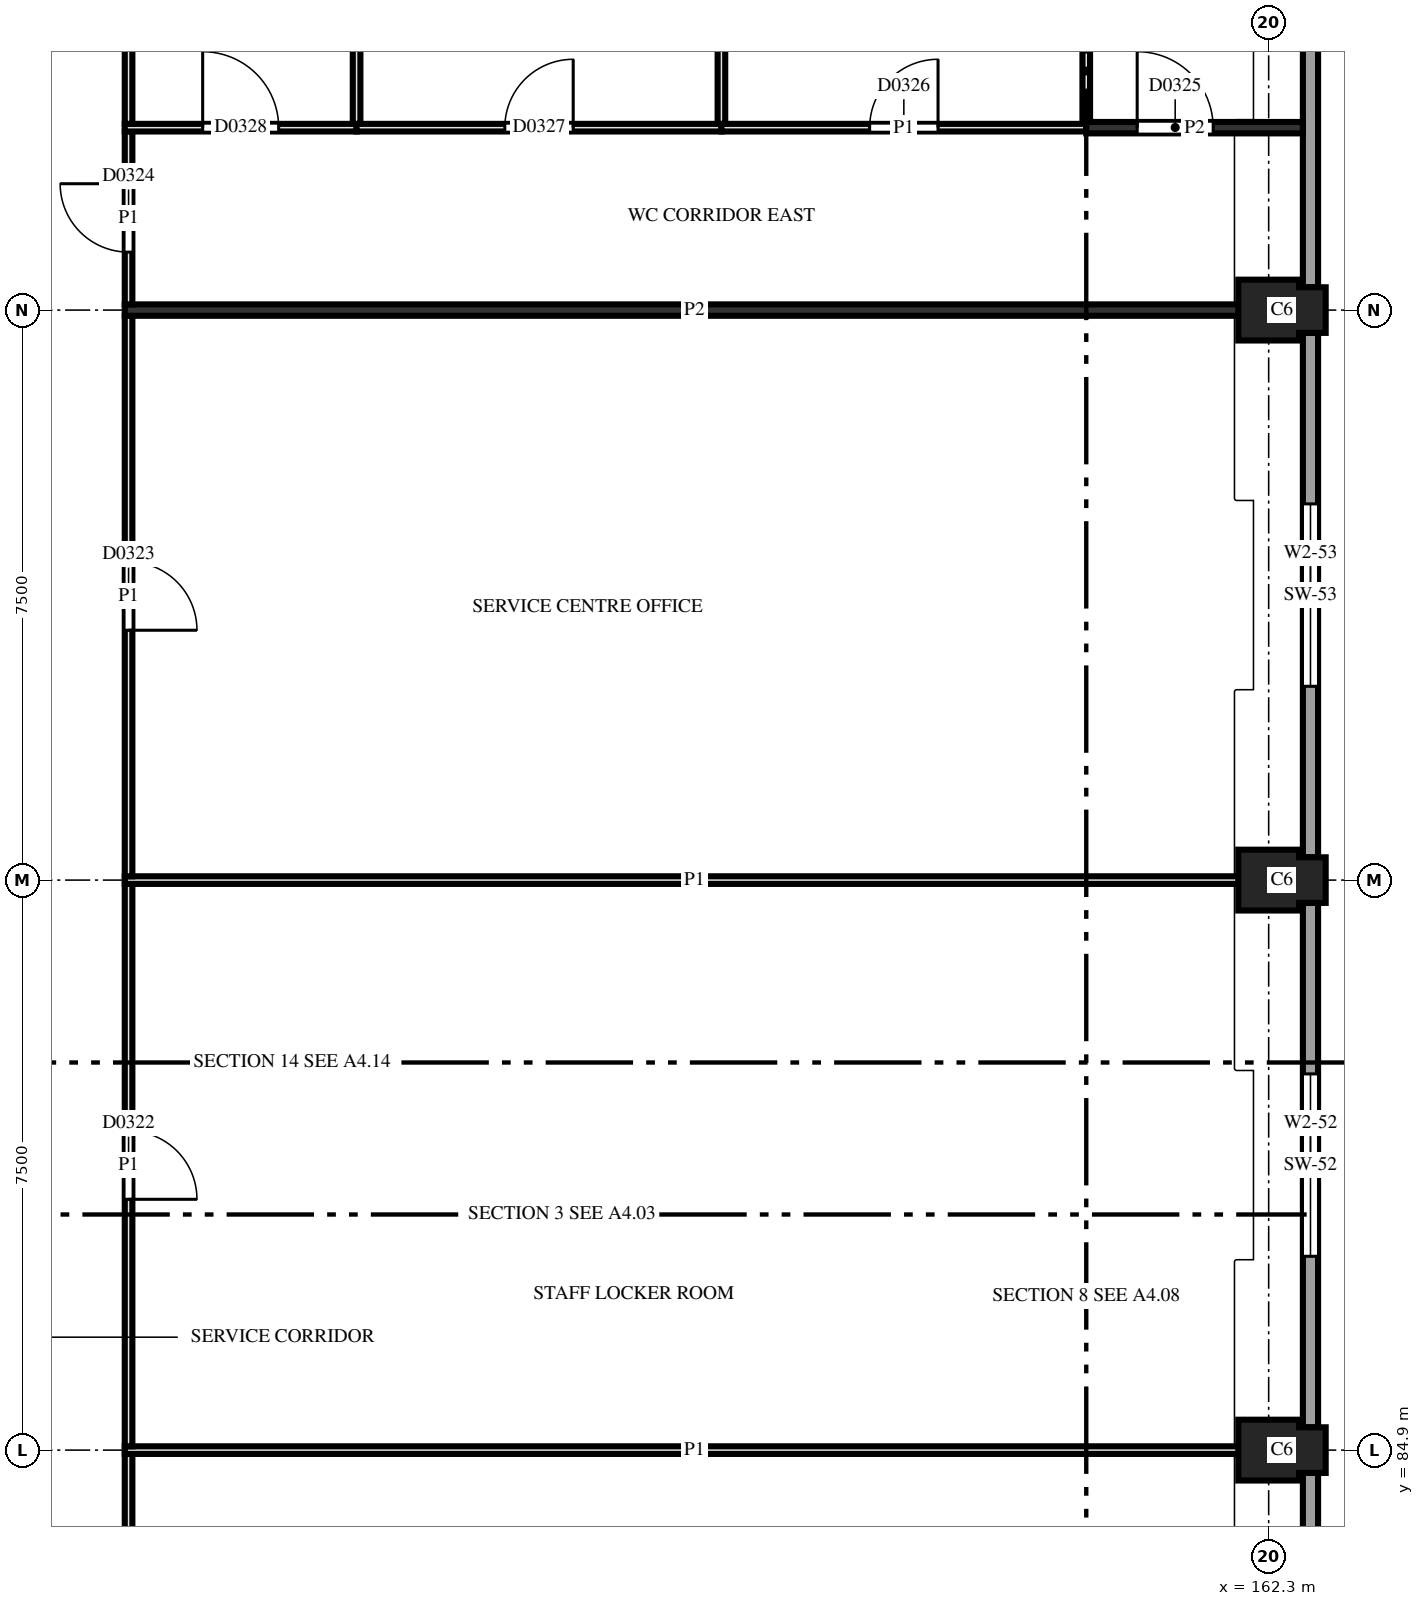
"""IFC4 building model, lengths in metres.
Left out: names, types, materials, properties, quantities, classifications, styles, units other than length and angle.
Written with IfcOpenShell. Run it as: python <this file> out.ifc"""

import sys

from ifc_helpers import new_model, si_unit, direction, frame, frame_2d, origin, place, context, subcontext, project, spatial, polyline, rectangle, outline, extrude, element, fill, save


model = new_model("IFC4")
c1 = context("Model", 3, precision=1e-05, world=origin(), true_north=direction((0.0, 1.0)))
c2 = subcontext(c1, "Body", "Model", "MODEL_VIEW")
j1 = project(units=[si_unit("LENGTHUNIT", "METRE"), si_unit("PLANEANGLEUNIT", "RADIAN")], contexts=[c1])
p1 = place(None, origin())
s1 = spatial("IfcSite", under=j1, at=p1, CompositionType="ELEMENT")
p2 = place(p1, origin())
s2 = spatial("IfcBuilding", under=s1, at=p2, CompositionType="ELEMENT")
p3 = place(p2, frame((0.0, 0.0, 11.9)))
s3 = spatial("IfcBuildingStorey", under=s2, at=p3, CompositionType="ELEMENT", Elevation=11.9)
for number, where, z_axis, x_axis in (
    (1, (162.3, 84.9, 0.0), (0.0, 0.0, 1.0), (1.0, 0.0, 0.0)),
    (2, (162.3, 92.4, 0.0), (0.0, 0.0, 1.0), (1.0, 0.0, 0.0)),
    (3, (162.3, 99.9, 0.0), (0.0, 0.0, 1.0), (1.0, 0.0, 0.0)),
):
    element("IfcColumn", number, at=place(p3, frame(where, z_axis=z_axis, x_axis=x_axis)), inside=s3, PredefinedType="COLUMN", context=c2, shape_type="SweptSolid", body=[
        extrude(outline(polyline([(-0.4, -0.4), (0.4, -0.4), (0.4, -0.3), (0.75, -0.3), (0.75, 0.3), (0.4, 0.3), (0.4, 0.4), (-0.4, 0.4), (-0.4, -0.4)])), origin(), (0.0, 0.0, 1.0), 3.7),
    ])
p4 = place(p3, frame((162.85, 77.7, 0.0), z_axis=(0.0, 0.0, 1.0), x_axis=(0.0, 1.0, 0.0)))
e4 = element("IfcWall", 4, at=p4, inside=s3, PredefinedType="SOLIDWALL", context=c2, shape_type="SweptSolid", body=[
    extrude(rectangle(XDim=6.9, YDim=0.2, at=frame_2d((3.45, 0.0))), origin(), (0.0, 0.0, 1.0), 2.3),
])
p5 = place(p4, frame((2.25, 0.0, 0.55)))
e5 = element("IfcOpeningElement", 5, at=p5, cuts=e4, PredefinedType="OPENING", context=c2, shape_type="SweptSolid", body=[
    extrude(rectangle(XDim=2.4, YDim=1.0, at=frame_2d((1.2, 0.5))), frame((0.0, 0.11, 0.0), z_axis=(0.0, -1.0, 0.0), x_axis=(1.0, 0.0, 0.0)), (0.0, 0.0, 1.0), 0.22),
])
p6 = place(p3, frame((162.85, 85.2, 0.0), z_axis=(0.0, 0.0, 1.0), x_axis=(0.0, 1.0, 0.0)))
e6 = element("IfcWall", 6, at=p6, inside=s3, PredefinedType="SOLIDWALL", context=c2, shape_type="SweptSolid", body=[
    extrude(rectangle(XDim=6.9, YDim=0.2, at=frame_2d((3.45, 0.0))), origin(), (0.0, 0.0, 1.0), 2.3),
])
p7 = place(p6, frame((2.25, 0.0, 0.55)))
e7 = element("IfcOpeningElement", 7, at=p7, cuts=e6, PredefinedType="OPENING", context=c2, shape_type="SweptSolid", body=[
    extrude(rectangle(XDim=2.4, YDim=1.0, at=frame_2d((1.2, 0.5))), frame((0.0, 0.11, 0.0), z_axis=(0.0, -1.0, 0.0), x_axis=(1.0, 0.0, 0.0)), (0.0, 0.0, 1.0), 0.22),
])
p8 = place(p3, frame((162.85, 92.7, 0.0), z_axis=(0.0, 0.0, 1.0), x_axis=(0.0, 1.0, 0.0)))
e8 = element("IfcWall", 8, at=p8, inside=s3, PredefinedType="SOLIDWALL", context=c2, shape_type="SweptSolid", body=[
    extrude(rectangle(XDim=6.9, YDim=0.2, at=frame_2d((3.45, 0.0))), origin(), (0.0, 0.0, 1.0), 2.3),
])
p9 = place(p8, frame((2.25, 0.0, 0.55)))
e9 = element("IfcOpeningElement", 9, at=p9, cuts=e8, PredefinedType="OPENING", context=c2, shape_type="SweptSolid", body=[
    extrude(rectangle(XDim=2.4, YDim=1.0, at=frame_2d((1.2, 0.5))), frame((0.0, 0.11, 0.0), z_axis=(0.0, -1.0, 0.0), x_axis=(1.0, 0.0, 0.0)), (0.0, 0.0, 1.0), 0.22),
])
p10 = place(p3, frame((162.85, 100.2, 0.0), z_axis=(0.0, 0.0, 1.0), x_axis=(0.0, 1.0, 0.0)))
e10 = element("IfcWall", 10, at=p10, inside=s3, PredefinedType="SOLIDWALL", context=c2, shape_type="SweptSolid", body=[
    extrude(rectangle(XDim=6.9, YDim=0.2, at=frame_2d((3.45, 0.0))), origin(), (0.0, 0.0, 1.0), 2.3),
])
p11 = place(p10, frame((3.4, 0.0, 0.55)))
e11 = element("IfcOpeningElement", 11, at=p11, cuts=e10, PredefinedType="OPENING", context=c2, shape_type="SweptSolid", body=[
    extrude(rectangle(XDim=2.4, YDim=1.0, at=frame_2d((1.2, 0.5))), frame((0.0, 0.11, 0.0), z_axis=(0.0, -1.0, 0.0), x_axis=(1.0, 0.0, 0.0)), (0.0, 0.0, 1.0), 0.22),
])
p12 = place(p3, frame((147.3, 84.85, 0.0), z_axis=(0.0, 0.0, 1.0), x_axis=(0.0, -1.0, 0.0)))
e12 = element("IfcWall", 12, at=p12, inside=s3, PredefinedType="PARTITIONING", context=c2, shape_type="SweptSolid", body=[
    extrude(rectangle(XDim=7.4, YDim=0.1, at=frame_2d((3.7, 0.0))), origin(), (0.0, 0.0, 1.0), 2.88),
])
p13 = place(p12, frame((3.25, 0.0, 0.0)))
e13 = element("IfcOpeningElement", 13, at=p13, cuts=e12, PredefinedType="OPENING", context=c2, shape_type="SweptSolid", body=[
    extrude(rectangle(XDim=0.9, YDim=2.1, at=frame_2d((0.45, 1.05))), frame((0.0, 0.06, 0.0), z_axis=(0.0, -1.0, 0.0), x_axis=(1.0, 0.0, 0.0)), (0.0, 0.0, 1.0), 0.12),
])
p14 = place(p3, frame((162.24, 84.9, 0.0), z_axis=(0.0, 0.0, 1.0), x_axis=(-1.0, 0.0, 0.0)))
e14 = element("IfcWall", 14, at=p14, inside=s3, PredefinedType="PARTITIONING", context=c2, shape_type="SweptSolid", body=[
    extrude(rectangle(XDim=14.99, YDim=0.1, at=frame_2d((7.495, 0.0))), origin(), (0.0, 0.0, 1.0), 2.88),
])
p15 = place(p3, frame((147.3, 92.35, 0.0), z_axis=(0.0, 0.0, 1.0), x_axis=(0.0, -1.0, 0.0)))
e15 = element("IfcWall", 15, at=p15, inside=s3, PredefinedType="PARTITIONING", context=c2, shape_type="SweptSolid", body=[
    extrude(rectangle(XDim=7.4, YDim=0.1, at=frame_2d((3.7, 0.0))), origin(), (0.0, 0.0, 1.0), 2.88),
])
p16 = place(p15, frame((3.25, 0.0, 0.0)))
e16 = element("IfcOpeningElement", 16, at=p16, cuts=e15, PredefinedType="OPENING", context=c2, shape_type="SweptSolid", body=[
    extrude(rectangle(XDim=0.9, YDim=2.1, at=frame_2d((0.45, 1.05))), frame((0.0, 0.06, 0.0), z_axis=(0.0, -1.0, 0.0), x_axis=(1.0, 0.0, 0.0)), (0.0, 0.0, 1.0), 0.12),
])
p17 = place(p3, frame((162.24, 92.4, 0.0), z_axis=(0.0, 0.0, 1.0), x_axis=(-1.0, 0.0, 0.0)))
e17 = element("IfcWall", 17, at=p17, inside=s3, PredefinedType="PARTITIONING", context=c2, shape_type="SweptSolid", body=[
    extrude(rectangle(XDim=14.99, YDim=0.1, at=frame_2d((7.495, 0.0))), origin(), (0.0, 0.0, 1.0), 2.88),
])
p18 = place(p3, frame((147.3, 99.825, 0.0), z_axis=(0.0, 0.0, 1.0), x_axis=(0.0, -1.0, 0.0)))
e18 = element("IfcWall", 18, at=p18, inside=s3, PredefinedType="PARTITIONING", context=c2, shape_type="SweptSolid", body=[
    extrude(rectangle(XDim=7.375, YDim=0.1, at=frame_2d((3.688, 0.0))), origin(), (0.0, 0.0, 1.0), 2.88),
])
p19 = place(p18, frame((3.238, 0.0, 0.0)))
e19 = element("IfcOpeningElement", 19, at=p19, cuts=e18, PredefinedType="OPENING", context=c2, shape_type="SweptSolid", body=[
    extrude(rectangle(XDim=0.9, YDim=2.1, at=frame_2d((0.45, 1.05))), frame((0.0, 0.06, 0.0), z_axis=(0.0, -1.0, 0.0), x_axis=(1.0, 0.0, 0.0)), (0.0, 0.0, 1.0), 0.12),
])
p20 = place(p3, frame((162.24, 99.9, 0.0), z_axis=(0.0, 0.0, 1.0), x_axis=(-1.0, 0.0, 0.0)))
e20 = element("IfcWall", 20, at=p20, inside=s3, PredefinedType="PARTITIONING", context=c2, shape_type="SweptSolid", body=[
    extrude(rectangle(XDim=14.99, YDim=0.15, at=frame_2d((7.495, 0.0))), origin(), (0.0, 0.0, 1.0), 2.88),
])
p21 = place(p3, frame((147.3, 102.25, 0.0), z_axis=(0.0, 0.0, 1.0), x_axis=(0.0, -1.0, 0.0)))
e21 = element("IfcWall", 21, at=p21, inside=s3, PredefinedType="PARTITIONING", context=c2, shape_type="SweptSolid", body=[
    extrude(rectangle(XDim=2.275, YDim=0.1, at=frame_2d((1.137, 0.0))), origin(), (0.0, 0.0, 1.0), 2.88),
])
p22 = place(p21, frame((0.688, 0.0, 0.0)))
e22 = element("IfcOpeningElement", 22, at=p22, cuts=e21, PredefinedType="OPENING", context=c2, shape_type="SweptSolid", body=[
    extrude(rectangle(XDim=0.9, YDim=2.1, at=frame_2d((0.45, 1.05))), frame((0.0, 0.06, 0.0), z_axis=(0.0, -1.0, 0.0), x_axis=(1.0, 0.0, 0.0)), (0.0, 0.0, 1.0), 0.12),
])
p23 = place(p3, frame((150.3, 102.3, 0.0), z_axis=(0.0, 0.0, 1.0), x_axis=(-1.0, 0.0, 0.0)))
e23 = element("IfcWall", 23, at=p23, inside=s3, PredefinedType="PARTITIONING", context=c2, shape_type="SweptSolid", body=[
    extrude(rectangle(XDim=3.05, YDim=0.1, at=frame_2d((1.525, 0.0))), origin(), (0.0, 0.0, 1.0), 2.88),
])
p24 = place(p23, frame((1.025, 0.0, 0.0)))
e24 = element("IfcOpeningElement", 24, at=p24, cuts=e23, PredefinedType="OPENING", context=c2, shape_type="SweptSolid", body=[
    extrude(rectangle(XDim=1.0, YDim=2.1, at=frame_2d((0.5, 1.05))), frame((0.0, 0.06, 0.0), z_axis=(0.0, -1.0, 0.0), x_axis=(1.0, 0.0, 0.0)), (0.0, 0.0, 1.0), 0.12),
])
p25 = place(p3, frame((155.1, 102.3, 0.0), z_axis=(0.0, 0.0, 1.0), x_axis=(-1.0, 0.0, 0.0)))
e25 = element("IfcWall", 25, at=p25, inside=s3, PredefinedType="PARTITIONING", context=c2, shape_type="SweptSolid", body=[
    extrude(rectangle(XDim=4.8, YDim=0.1, at=frame_2d((2.4, 0.0))), origin(), (0.0, 0.0, 1.0), 2.88),
])
p26 = place(p25, frame((1.95, 0.0, 0.0)))
e26 = element("IfcOpeningElement", 26, at=p26, cuts=e25, PredefinedType="OPENING", context=c2, shape_type="SweptSolid", body=[
    extrude(rectangle(XDim=0.9, YDim=2.1, at=frame_2d((0.45, 1.05))), frame((0.0, 0.06, 0.0), z_axis=(0.0, -1.0, 0.0), x_axis=(1.0, 0.0, 0.0)), (0.0, 0.0, 1.0), 0.12),
])
p27 = place(p3, frame((159.9, 102.3, 0.0), z_axis=(0.0, 0.0, 1.0), x_axis=(-1.0, 0.0, 0.0)))
e27 = element("IfcWall", 27, at=p27, inside=s3, PredefinedType="PARTITIONING", context=c2, shape_type="SweptSolid", body=[
    extrude(rectangle(XDim=4.8, YDim=0.1, at=frame_2d((2.4, 0.0))), origin(), (0.0, 0.0, 1.0), 2.88),
])
p28 = place(p27, frame((1.95, 0.0, 0.0)))
e28 = element("IfcOpeningElement", 28, at=p28, cuts=e27, PredefinedType="OPENING", context=c2, shape_type="SweptSolid", body=[
    extrude(rectangle(XDim=0.9, YDim=2.1, at=frame_2d((0.45, 1.05))), frame((0.0, 0.06, 0.0), z_axis=(0.0, -1.0, 0.0), x_axis=(1.0, 0.0, 0.0)), (0.0, 0.0, 1.0), 0.12),
])
p29 = place(p3, frame((162.75, 102.3, 0.0), z_axis=(0.0, 0.0, 1.0), x_axis=(-1.0, 0.0, 0.0)))
e29 = element("IfcWall", 29, at=p29, inside=s3, PredefinedType="PARTITIONING", context=c2, shape_type="SweptSolid", body=[
    extrude(rectangle(XDim=2.85, YDim=0.15, at=frame_2d((1.425, 0.0))), origin(), (0.0, 0.0, 1.0), 2.88),
])
p30 = place(p29, frame((1.18, 0.0, 0.0)))
e30 = element("IfcOpeningElement", 30, at=p30, cuts=e29, PredefinedType="OPENING", context=c2, shape_type="SweptSolid", body=[
    extrude(rectangle(XDim=1.0, YDim=2.1, at=frame_2d((0.5, 1.05))), frame((0.0, 0.085, 0.0), z_axis=(0.0, -1.0, 0.0), x_axis=(1.0, 0.0, 0.0)), (0.0, 0.0, 1.0), 0.17),
])
for number, where, z_axis, x_axis in (
    (31, (147.3, 107.35, 0.0), (0.0, 0.0, 1.0), (0.0, -1.0, 0.0)),
    (32, (150.3, 107.35, 0.0), (0.0, 0.0, 1.0), (0.0, -1.0, 0.0)),
):
    element("IfcWall", number, at=place(p3, frame(where, z_axis=z_axis, x_axis=x_axis)), inside=s3, PredefinedType="PARTITIONING", context=c2, shape_type="SweptSolid", body=[
        extrude(rectangle(XDim=5.0, YDim=0.1, at=frame_2d((2.5, 0.0))), origin(), (0.0, 0.0, 1.0), 2.88),
    ])
p31 = place(p3, frame((155.1, 107.3, 0.0), z_axis=(0.0, 0.0, 1.0), x_axis=(0.0, -1.0, 0.0)))
e33 = element("IfcWall", 33, at=p31, inside=s3, PredefinedType="PARTITIONING", context=c2, shape_type="SweptSolid", body=[
    extrude(rectangle(XDim=4.95, YDim=0.1, at=frame_2d((2.475, 0.0))), origin(), (0.0, 0.0, 1.0), 2.88),
])
p32 = place(p3, frame((159.9, 107.35, 0.0), z_axis=(0.0, 0.0, 1.0), x_axis=(0.0, -1.0, 0.0)))
e34 = element("IfcWall", 34, at=p32, inside=s3, PredefinedType="PARTITIONING", context=c2, shape_type="SweptSolid", body=[
    extrude(rectangle(XDim=4.975, YDim=0.1, at=frame_2d((2.488, 0.0))), origin(), (0.0, 0.0, 1.0), 2.88),
])
p33 = place(p7, origin())
e35 = element("IfcWindow", 35, at=p33, inside=s3, PartitioningType="SINGLE_PANEL", PredefinedType="WINDOW", context=c2, shape_type="SweptSolid", body=[
    extrude(rectangle(XDim=2.4, YDim=1.0, at=frame_2d((1.2, 0.5))), frame((0.0, 0.03, 0.0), z_axis=(0.0, -1.0, 0.0), x_axis=(1.0, 0.0, 0.0)), (0.0, 0.0, 1.0), 0.06),
])
fill(e7, e35)
p34 = place(p9, origin())
e36 = element("IfcWindow", 36, at=p34, inside=s3, PartitioningType="SINGLE_PANEL", PredefinedType="WINDOW", context=c2, shape_type="SweptSolid", body=[
    extrude(rectangle(XDim=2.4, YDim=1.0, at=frame_2d((1.2, 0.5))), frame((0.0, 0.03, 0.0), z_axis=(0.0, -1.0, 0.0), x_axis=(1.0, 0.0, 0.0)), (0.0, 0.0, 1.0), 0.06),
])
fill(e9, e36)
p35 = place(p16, origin())
e37 = element("IfcDoor", 37, at=p35, inside=s3, OperationType="SINGLE_SWING_LEFT", PredefinedType="DOOR", context=c2, shape_type="SweptSolid", body=[
    extrude(rectangle(XDim=0.9, YDim=2.1, at=frame_2d((0.45, 1.05))), frame((0.0, 0.025, 0.0), z_axis=(0.0, -1.0, 0.0), x_axis=(1.0, 0.0, 0.0)), (0.0, 0.0, 1.0), 0.05),
])
fill(e16, e37)
p36 = place(p19, origin())
e38 = element("IfcDoor", 38, at=p36, inside=s3, OperationType="SINGLE_SWING_LEFT", PredefinedType="DOOR", context=c2, shape_type="SweptSolid", body=[
    extrude(rectangle(XDim=0.9, YDim=2.1, at=frame_2d((0.45, 1.05))), frame((0.0, 0.025, 0.0), z_axis=(0.0, -1.0, 0.0), x_axis=(1.0, 0.0, 0.0)), (0.0, 0.0, 1.0), 0.05),
])
fill(e19, e38)
p37 = place(p22, origin())
e39 = element("IfcDoor", 39, at=p37, inside=s3, OperationType="SINGLE_SWING_LEFT", PredefinedType="DOOR", context=c2, shape_type="SweptSolid", body=[
    extrude(rectangle(XDim=0.9, YDim=2.1, at=frame_2d((0.45, 1.05))), frame((0.0, 0.025, 0.0), z_axis=(0.0, -1.0, 0.0), x_axis=(1.0, 0.0, 0.0)), (0.0, 0.0, 1.0), 0.05),
])
fill(e22, e39)
p38 = place(p30, origin())
e40 = element("IfcDoor", 40, at=p38, inside=s3, OperationType="SINGLE_SWING_RIGHT", PredefinedType="DOOR", context=c2, shape_type="SweptSolid", body=[
    extrude(rectangle(XDim=1.0, YDim=2.1, at=frame_2d((0.5, 1.05))), frame((0.0, 0.025, 0.0), z_axis=(0.0, -1.0, 0.0), x_axis=(1.0, 0.0, 0.0)), (0.0, 0.0, 1.0), 0.05),
])
fill(e30, e40)
p39 = place(p28, origin())
e41 = element("IfcDoor", 41, at=p39, inside=s3, OperationType="SINGLE_SWING_LEFT", PredefinedType="DOOR", context=c2, shape_type="SweptSolid", body=[
    extrude(rectangle(XDim=0.9, YDim=2.1, at=frame_2d((0.45, 1.05))), frame((0.0, 0.025, 0.0), z_axis=(0.0, -1.0, 0.0), x_axis=(1.0, 0.0, 0.0)), (0.0, 0.0, 1.0), 0.05),
])
fill(e28, e41)
p40 = place(p26, origin())
e42 = element("IfcDoor", 42, at=p40, inside=s3, OperationType="SINGLE_SWING_LEFT", PredefinedType="DOOR", context=c2, shape_type="SweptSolid", body=[
    extrude(rectangle(XDim=0.9, YDim=2.1, at=frame_2d((0.45, 1.05))), frame((0.0, 0.025, 0.0), z_axis=(0.0, -1.0, 0.0), x_axis=(1.0, 0.0, 0.0)), (0.0, 0.0, 1.0), 0.05),
])
fill(e26, e42)
p41 = place(p24, origin())
e43 = element("IfcDoor", 43, at=p41, inside=s3, OperationType="SINGLE_SWING_RIGHT", PredefinedType="DOOR", context=c2, shape_type="SweptSolid", body=[
    extrude(rectangle(XDim=1.0, YDim=2.1, at=frame_2d((0.5, 1.05))), frame((0.0, 0.025, 0.0), z_axis=(0.0, -1.0, 0.0), x_axis=(1.0, 0.0, 0.0)), (0.0, 0.0, 1.0), 0.05),
])
fill(e24, e43)
save(model, sys.argv[1])
